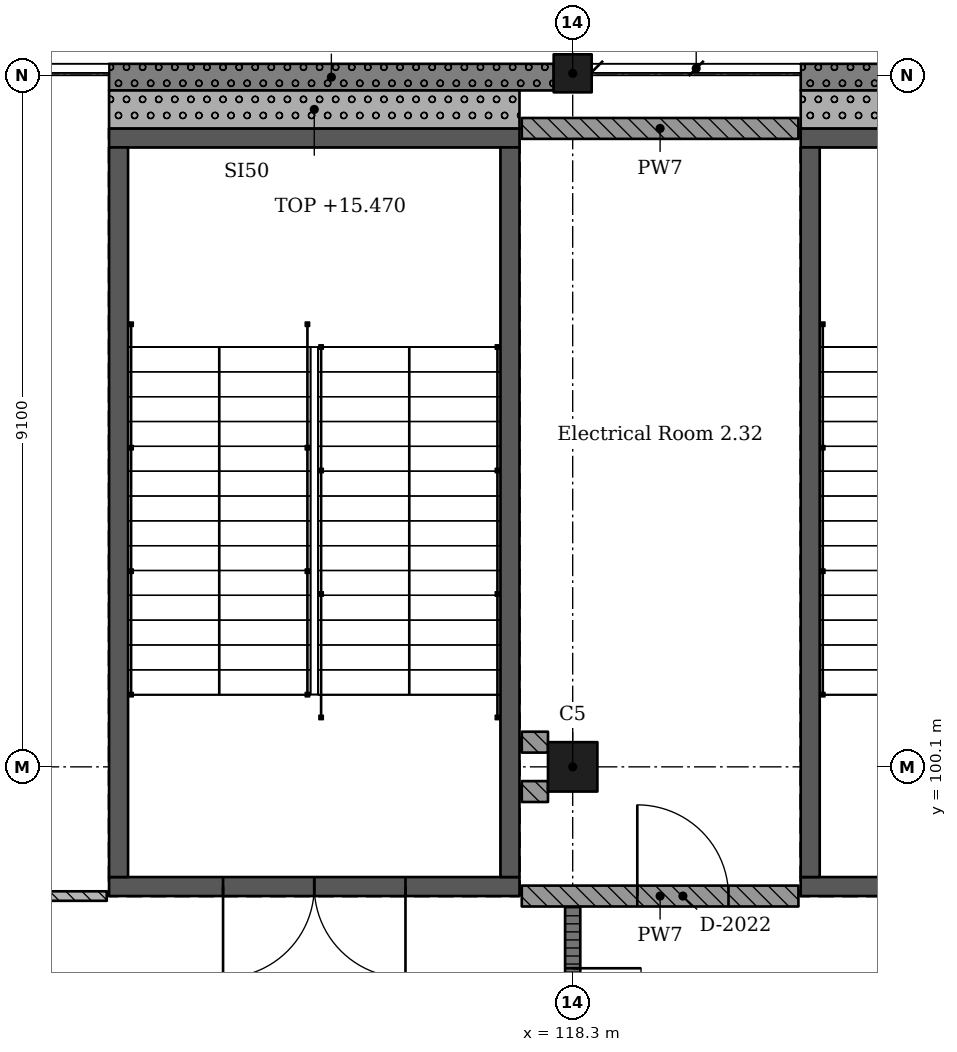
"""IFC4 building model, lengths in metres.
Left out: names, types, materials, properties, quantities, classifications, styles, units other than length and angle.
Written with IfcOpenShell. Run it as: python <this file> out.ifc"""

import sys

from ifc_helpers import new_model, si_unit, direction, frame, frame_2d, origin, origin_2d, place, context, subcontext, project, spatial, rectangle, extrude, element, fill, save


model = new_model("IFC4")
c1 = context("Model", 3, precision=1e-05, world=origin(), true_north=direction((0.0, 1.0)))
c2 = subcontext(c1, "Body", "Model", "MODEL_VIEW")
j1 = project(units=[si_unit("LENGTHUNIT", "METRE"), si_unit("PLANEANGLEUNIT", "RADIAN")], contexts=[c1])
p1 = place(None, origin())
s1 = spatial("IfcSite", under=j1, at=p1, CompositionType="ELEMENT")
p2 = place(p1, origin())
s2 = spatial("IfcBuilding", under=s1, at=p2, CompositionType="ELEMENT")
p3 = place(p2, frame((0.0, 0.0, 10.92)))
s3 = spatial("IfcBuildingStorey", under=s2, at=p3, CompositionType="ELEMENT", Elevation=10.92)
p4 = place(p3, frame((118.3, 100.1, 0.0), z_axis=(0.0, 0.0, 1.0), x_axis=(1.0, 0.0, 0.0)))
e1 = element("IfcColumn", 1, at=p4, inside=s3, PredefinedType="COLUMN", context=c2, shape_type="SweptSolid", body=[
    extrude(rectangle(XDim=0.65, YDim=0.65, at=origin_2d()), origin(), (0.0, 0.0, 1.0), 4.55),
])
p5 = place(p3, frame((118.3, 109.225, 0.0), z_axis=(0.0, 0.0, 1.0), x_axis=(1.0, 0.0, 0.0)))
e2 = element("IfcColumn", 2, at=p5, inside=s3, PredefinedType="COLUMN", context=c2, shape_type="SweptSolid", body=[
    extrude(rectangle(XDim=0.5, YDim=0.5, at=origin_2d()), origin(), (0.0, 0.0, 1.0), 4.55),
])
p6 = place(p3, frame((126.7, 98.525, 0.0), z_axis=(0.0, 0.0, 1.0), x_axis=(-1.0, 0.0, 0.0)))
e3 = element("IfcWall", 3, at=p6, inside=s3, PredefinedType="SHEAR", context=c2, shape_type="SweptSolid", body=[
    extrude(rectangle(XDim=5.4, YDim=0.25, at=frame_2d((2.7, 0.0))), origin(), (0.0, 0.0, 1.0), 4.55),
])
p7 = place(p6, frame((1.5, 0.0, 0.0)))
e4 = element("IfcOpeningElement", 4, at=p7, cuts=e3, PredefinedType="OPENING", context=c2, shape_type="SweptSolid", body=[
    extrude(rectangle(XDim=2.4, YDim=2.1, at=frame_2d((1.2, 1.05))), frame((0.0, 0.135, 0.0), z_axis=(0.0, -1.0, 0.0), x_axis=(1.0, 0.0, 0.0)), (0.0, 0.0, 1.0), 0.27),
])
p8 = place(p3, frame((126.7, 108.375, 0.0), z_axis=(0.0, 0.0, 1.0), x_axis=(-1.0, 0.0, 0.0)))
e5 = element("IfcWall", 5, at=p8, inside=s3, PredefinedType="SHEAR", context=c2, shape_type="SweptSolid", body=[
    extrude(rectangle(XDim=5.4, YDim=0.25, at=frame_2d((2.7, 0.0))), origin(), (0.0, 0.0, 1.0), 4.55),
])
p9 = place(p3, frame((121.425, 108.25, 0.0), z_axis=(0.0, 0.0, 1.0), x_axis=(0.0, -1.0, 0.0)))
e6 = element("IfcWall", 6, at=p9, inside=s3, PredefinedType="SHEAR", context=c2, shape_type="SweptSolid", body=[
    extrude(rectangle(XDim=9.6, YDim=0.25, at=frame_2d((4.8, 0.0))), origin(), (0.0, 0.0, 1.0), 4.55),
])
p10 = place(p3, frame((117.6, 98.525, 0.0), z_axis=(0.0, 0.0, 1.0), x_axis=(-1.0, 0.0, 0.0)))
e7 = element("IfcWall", 7, at=p10, inside=s3, PredefinedType="SHEAR", context=c2, shape_type="SweptSolid", body=[
    extrude(rectangle(XDim=5.4, YDim=0.25, at=frame_2d((2.7, 0.0))), origin(), (0.0, 0.0, 1.0), 4.55),
])
p11 = place(p10, frame((1.5, 0.0, 0.0)))
e8 = element("IfcOpeningElement", 8, at=p11, cuts=e7, PredefinedType="OPENING", context=c2, shape_type="SweptSolid", body=[
    extrude(rectangle(XDim=2.4, YDim=2.1, at=frame_2d((1.2, 1.05))), frame((0.0, 0.135, 0.0), z_axis=(0.0, -1.0, 0.0), x_axis=(1.0, 0.0, 0.0)), (0.0, 0.0, 1.0), 0.27),
])
p12 = place(p3, frame((117.6, 108.375, 0.0), z_axis=(0.0, 0.0, 1.0), x_axis=(-1.0, 0.0, 0.0)))
e9 = element("IfcWall", 9, at=p12, inside=s3, PredefinedType="SHEAR", context=c2, shape_type="SweptSolid", body=[
    extrude(rectangle(XDim=5.4, YDim=0.25, at=frame_2d((2.7, 0.0))), origin(), (0.0, 0.0, 1.0), 4.55),
])
for number, where, z_axis, x_axis in (
    (10, (112.325, 108.25, 0.0), (0.0, 0.0, 1.0), (0.0, -1.0, 0.0)),
    (11, (117.475, 108.25, 0.0), (0.0, 0.0, 1.0), (0.0, -1.0, 0.0)),
):
    element("IfcWall", number, at=place(p3, frame(where, z_axis=z_axis, x_axis=x_axis)), inside=s3, PredefinedType="SHEAR", context=c2, shape_type="SweptSolid", body=[
        extrude(rectangle(XDim=9.6, YDim=0.25, at=frame_2d((4.8, 0.0))), origin(), (0.0, 0.0, 1.0), 4.55),
    ])
p13 = place(p3, frame((127.15, 109.175, 0.0), z_axis=(0.0, 0.0, 1.0), x_axis=(-1.0, 0.0, 0.0)))
e12 = element("IfcWall", 12, at=p13, inside=s3, PredefinedType="SOLIDWALL", context=c2, shape_type="SweptSolid", body=[
    extrude(rectangle(XDim=5.85, YDim=0.35, at=frame_2d((2.925, 0.0))), origin(), (0.0, 0.0, 1.0), 3.5),
])
p14 = place(p3, frame((118.05, 109.175, 0.0), z_axis=(0.0, 0.0, 1.0), x_axis=(-1.0, 0.0, 0.0)))
e13 = element("IfcWall", 13, at=p14, inside=s3, PredefinedType="SOLIDWALL", context=c2, shape_type="SweptSolid", body=[
    extrude(rectangle(XDim=5.85, YDim=0.35, at=frame_2d((2.925, 0.0))), origin(), (0.0, 0.0, 1.0), 3.5),
])
p15 = place(p3, frame((121.3, 108.75, 0.0), z_axis=(0.0, 0.0, 1.0), x_axis=(1.0, 0.0, 0.0)))
e14 = element("IfcWall", 14, at=p15, inside=s3, PredefinedType="SOLIDWALL", context=c2, shape_type="SweptSolid", body=[
    extrude(rectangle(XDim=5.4, YDim=0.5, at=frame_2d((2.7, 0.0))), origin(), (0.0, 0.0, 1.0), 4.55),
])
p16 = place(p3, frame((112.2, 108.75, 0.0), z_axis=(0.0, 0.0, 1.0), x_axis=(1.0, 0.0, 0.0)))
e15 = element("IfcWall", 15, at=p16, inside=s3, PredefinedType="SOLIDWALL", context=c2, shape_type="SweptSolid", body=[
    extrude(rectangle(XDim=5.4, YDim=0.5, at=frame_2d((2.7, 0.0))), origin(), (0.0, 0.0, 1.0), 4.55),
])
p17 = place(p3, frame((109.512, 98.4, 0.0), z_axis=(0.0, 0.0, 1.0), x_axis=(1.0, 0.0, 0.0)))
e16 = element("IfcWall", 16, at=p17, inside=s3, PredefinedType="PARTITIONING", context=c2, shape_type="SweptSolid", body=[
    extrude(rectangle(XDim=2.657, YDim=0.125, at=frame_2d((1.329, 0.0))), origin(), (0.0, 0.0, 1.0), 4.25),
])
p18 = place(p3, frame((117.63, 98.4, 0.0), z_axis=(0.0, 0.0, 1.0), x_axis=(1.0, 0.0, 0.0)))
e17 = element("IfcWall", 17, at=p18, inside=s3, PredefinedType="SOLIDWALL", context=c2, shape_type="SweptSolid", body=[
    extrude(rectangle(XDim=3.64, YDim=0.275, at=frame_2d((1.82, 0.0))), origin(), (0.0, 0.0, 1.0), 4.25),
])
p19 = place(p18, frame((1.52, 0.0, 0.0)))
e18 = element("IfcOpeningElement", 18, at=p19, cuts=e17, PredefinedType="OPENING", context=c2, shape_type="SweptSolid", body=[
    extrude(rectangle(XDim=1.2, YDim=2.4, at=frame_2d((0.6, 1.2))), frame((0.0, 0.147, 0.0), z_axis=(0.0, -1.0, 0.0), x_axis=(1.0, 0.0, 0.0)), (0.0, 0.0, 1.0), 0.295),
])
p20 = place(p3, frame((117.63, 99.775, 0.0), z_axis=(0.0, 0.0, 1.0), x_axis=(1.0, 0.0, 0.0)))
e19 = element("IfcWall", 19, at=p20, inside=s3, PredefinedType="SOLIDWALL", context=c2, shape_type="SweptSolid", body=[
    extrude(rectangle(XDim=0.345, YDim=0.275, at=frame_2d((0.173, 0.0))), origin(), (0.0, 0.0, 1.0), 4.25),
])
p21 = place(p3, frame((117.63, 108.5, 0.0), z_axis=(0.0, 0.0, 1.0), x_axis=(1.0, 0.0, 0.0)))
e20 = element("IfcWall", 20, at=p21, inside=s3, PredefinedType="SOLIDWALL", context=c2, shape_type="SweptSolid", body=[
    extrude(rectangle(XDim=3.64, YDim=0.275, at=frame_2d((1.82, 0.0))), origin(), (0.0, 0.0, 1.0), 4.25),
])
p22 = place(p3, frame((117.975, 100.425, 0.0), z_axis=(0.0, 0.0, 1.0), x_axis=(-1.0, 0.0, 0.0)))
e21 = element("IfcWall", 21, at=p22, inside=s3, PredefinedType="SOLIDWALL", context=c2, shape_type="SweptSolid", body=[
    extrude(rectangle(XDim=0.345, YDim=0.275, at=frame_2d((0.173, 0.0))), origin(), (0.0, 0.0, 1.0), 4.25),
])
p23 = place(p3, frame((118.3, 91.4, 0.0), z_axis=(0.0, 0.0, 1.0), x_axis=(0.0, 1.0, 0.0)))
e22 = element("IfcWall", 22, at=p23, inside=s3, PredefinedType="PARTITIONING", context=c2, shape_type="SweptSolid", body=[
    extrude(rectangle(XDim=6.863, YDim=0.2, at=frame_2d((3.431, 0.0))), origin(), (0.0, 0.0, 1.0), 3.55),
])
p24 = place(p23, frame((0.85, 0.0, 0.0)))
e23 = element("IfcOpeningElement", 23, at=p24, cuts=e22, PredefinedType="OPENING", context=c2, shape_type="SweptSolid", body=[
    extrude(rectangle(XDim=1.8, YDim=2.4, at=frame_2d((0.9, 1.2))), frame((0.0, 0.11, 0.0), z_axis=(0.0, -1.0, 0.0), x_axis=(1.0, 0.0, 0.0)), (0.0, 0.0, 1.0), 0.22),
])
p25 = place(p23, frame((4.25, 0.0, 0.0)))
e24 = element("IfcOpeningElement", 24, at=p25, cuts=e22, PredefinedType="OPENING", context=c2, shape_type="SweptSolid", body=[
    extrude(rectangle(XDim=1.8, YDim=2.4, at=frame_2d((0.9, 1.2))), frame((0.0, 0.11, 0.0), z_axis=(0.0, -1.0, 0.0), x_axis=(1.0, 0.0, 0.0)), (0.0, 0.0, 1.0), 0.22),
])
p26 = place(p19, origin())
e25 = element("IfcDoor", 25, at=p26, inside=s3, OperationType="SINGLE_SWING_RIGHT", PredefinedType="DOOR", context=c2, shape_type="SweptSolid", body=[
    extrude(rectangle(XDim=1.2, YDim=2.4, at=frame_2d((0.6, 1.2))), frame((0.0, 0.025, 0.0), z_axis=(0.0, -1.0, 0.0), x_axis=(1.0, 0.0, 0.0)), (0.0, 0.0, 1.0), 0.05),
])
fill(e18, e25)
p27 = place(p25, origin())
e26 = element("IfcDoor", 26, at=p27, inside=s3, OperationType="DOUBLE_DOOR_SINGLE_SWING", PredefinedType="DOOR", context=c2, shape_type="SweptSolid", body=[
    extrude(rectangle(XDim=1.8, YDim=2.4, at=frame_2d((0.9, 1.2))), frame((0.0, 0.025, 0.0), z_axis=(0.0, -1.0, 0.0), x_axis=(1.0, 0.0, 0.0)), (0.0, 0.0, 1.0), 0.05),
])
fill(e24, e26)
p28 = place(p11, origin())
e27 = element("IfcDoor", 27, at=p28, inside=s3, OperationType="DOUBLE_DOOR_SINGLE_SWING", PredefinedType="DOOR", context=c2, shape_type="SweptSolid", body=[
    extrude(rectangle(XDim=2.4, YDim=2.1, at=frame_2d((1.2, 1.05))), frame((0.0, 0.025, 0.0), z_axis=(0.0, -1.0, 0.0), x_axis=(1.0, 0.0, 0.0)), (0.0, 0.0, 1.0), 0.05),
])
fill(e8, e27)
save(model, sys.argv[1])
